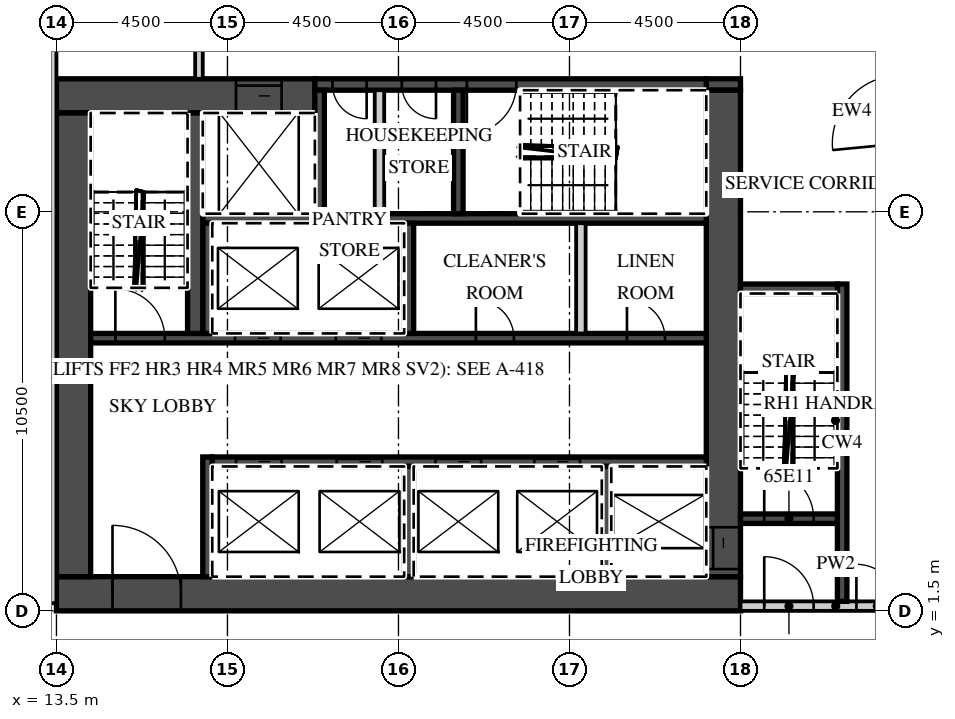
"""IFC4 building model, lengths in metres.
Left out: names, types, materials, properties, quantities, classifications, styles, units other than length and angle.
Written with IfcOpenShell. Run it as: python <this file> out.ifc"""

import sys

from ifc_helpers import new_model, si_unit, direction, frame, frame_2d, origin, place, context, subcontext, project, spatial, rectangle, extrude, element, fill, save


model = new_model("IFC4")
c1 = context("Model", 3, precision=1e-05, world=origin(), true_north=direction((0.0, 1.0)))
c2 = subcontext(c1, "Body", "Model", "MODEL_VIEW")
j1 = project(units=[si_unit("LENGTHUNIT", "METRE"), si_unit("PLANEANGLEUNIT", "RADIAN")], contexts=[c1])
p1 = place(None, origin())
s1 = spatial("IfcSite", under=j1, at=p1, CompositionType="ELEMENT")
p2 = place(p1, origin())
s2 = spatial("IfcBuilding", under=s1, at=p2, CompositionType="ELEMENT")
p3 = place(p2, frame((0.0, 0.0, 261.9)))
s3 = spatial("IfcBuildingStorey", under=s2, at=p3, CompositionType="ELEMENT", Elevation=261.9)
p4 = place(p3, frame((13.5, 1.95, 0.0), z_axis=(0.0, 0.0, 1.0), x_axis=(1.0, 0.0, 0.0)))
e1 = element("IfcWall", 1, at=p4, inside=s3, PredefinedType="SHEAR", context=c2, shape_type="SweptSolid", body=[
    extrude(rectangle(XDim=18.0, YDim=0.9, at=frame_2d((9.0, 0.0))), origin(), (0.0, 0.0, 1.0), 6.32),
])
p5 = place(p4, frame((1.475, 0.0, 0.0)))
e2 = element("IfcOpeningElement", 2, at=p5, cuts=e1, PredefinedType="OPENING", context=c2, shape_type="SweptSolid", body=[
    extrude(rectangle(XDim=1.8, YDim=2.1, at=frame_2d((0.9, 1.05))), frame((0.0, 0.46, 0.0), z_axis=(0.0, -1.0, 0.0), x_axis=(1.0, 0.0, 0.0)), (0.0, 0.0, 1.0), 0.92),
])
p6 = place(p3, frame((13.5, 15.05, 0.0), z_axis=(0.0, 0.0, 1.0), x_axis=(1.0, 0.0, 0.0)))
e3 = element("IfcWall", 3, at=p6, inside=s3, PredefinedType="SHEAR", context=c2, shape_type="SweptSolid", body=[
    extrude(rectangle(XDim=6.8, YDim=0.9, at=frame_2d((3.4, 0.0))), origin(), (0.0, 0.0, 1.0), 6.32),
])
p7 = place(p6, frame((4.725, 0.0, 0.0)))
e4 = element("IfcOpeningElement", 4, at=p7, cuts=e3, PredefinedType="OPENING", context=c2, shape_type="SweptSolid", body=[
    extrude(rectangle(XDim=1.2, YDim=2.1, at=frame_2d((0.6, 1.05))), frame((0.0, 0.46, 0.0), z_axis=(0.0, -1.0, 0.0), x_axis=(1.0, 0.0, 0.0)), (0.0, 0.0, 1.0), 0.92),
])
p8 = place(p3, frame((30.6, 15.35, 0.0), z_axis=(0.0, 0.0, 1.0), x_axis=(1.0, 0.0, 0.0)))
e5 = element("IfcWall", 5, at=p8, inside=s3, PredefinedType="SHEAR", context=c2, shape_type="SweptSolid", body=[
    extrude(rectangle(XDim=0.9, YDim=0.3, at=frame_2d((0.45, 0.0))), origin(), (0.0, 0.0, 1.0), 6.32),
])
p9 = place(p3, frame((20.3, 15.35, 0.0), z_axis=(0.0, 0.0, 1.0), x_axis=(1.0, 0.0, 0.0)))
e6 = element("IfcWall", 6, at=p9, inside=s3, PredefinedType="SHEAR", context=c2, shape_type="SweptSolid", body=[
    extrude(rectangle(XDim=10.3, YDim=0.3, at=frame_2d((5.15, 0.0))), origin(), (0.0, 0.0, 1.0), 6.32),
])
p10 = place(p9, frame((4.0, 0.0, 0.0)))
e7 = element("IfcOpeningElement", 7, at=p10, cuts=e6, PredefinedType="OPENING", context=c2, shape_type="SweptSolid", body=[
    extrude(rectangle(XDim=1.3, YDim=2.1, at=frame_2d((0.65, 1.05))), frame((0.0, 0.16, 0.0), z_axis=(0.0, -1.0, 0.0), x_axis=(1.0, 0.0, 0.0)), (0.0, 0.0, 1.0), 0.32),
])
p11 = place(p9, frame((2.288, 0.0, 0.0)))
e8 = element("IfcOpeningElement", 8, at=p11, cuts=e6, PredefinedType="OPENING", context=c2, shape_type="SweptSolid", body=[
    extrude(rectangle(XDim=0.9, YDim=2.1, at=frame_2d((0.45, 1.05))), frame((0.0, 0.16, 0.0), z_axis=(0.0, -1.0, 0.0), x_axis=(1.0, 0.0, 0.0)), (0.0, 0.0, 1.0), 0.32),
])
p12 = place(p9, frame((0.462, 0.0, 0.0)))
e9 = element("IfcOpeningElement", 9, at=p12, cuts=e6, PredefinedType="OPENING", context=c2, shape_type="SweptSolid", body=[
    extrude(rectangle(XDim=0.9, YDim=2.1, at=frame_2d((0.45, 1.05))), frame((0.0, 0.16, 0.0), z_axis=(0.0, -1.0, 0.0), x_axis=(1.0, 0.0, 0.0)), (0.0, 0.0, 1.0), 0.32),
])
p13 = place(p3, frame((31.05, 2.4, 0.0), z_axis=(0.0, 0.0, 1.0), x_axis=(0.0, 1.0, 0.0)))
e10 = element("IfcWall", 10, at=p13, inside=s3, PredefinedType="SHEAR", context=c2, shape_type="SweptSolid", body=[
    extrude(rectangle(XDim=12.8, YDim=0.9, at=frame_2d((6.4, 0.0))), origin(), (0.0, 0.0, 1.0), 6.32),
])
p14 = place(p13, frame((0.2, 0.0, 0.0)))
e11 = element("IfcOpeningElement", 11, at=p14, cuts=e10, PredefinedType="OPENING", context=c2, shape_type="SweptSolid", body=[
    extrude(rectangle(XDim=1.1, YDim=2.1, at=frame_2d((0.55, 1.05))), frame((0.0, 0.46, 0.0), z_axis=(0.0, -1.0, 0.0), x_axis=(1.0, 0.0, 0.0)), (0.0, 0.0, 1.0), 0.92),
])
p15 = place(p3, frame((13.95, 2.4, 0.0), z_axis=(0.0, 0.0, 1.0), x_axis=(0.0, 1.0, 0.0)))
e12 = element("IfcWall", 12, at=p15, inside=s3, PredefinedType="SHEAR", context=c2, shape_type="SweptSolid", body=[
    extrude(rectangle(XDim=12.2, YDim=0.9, at=frame_2d((6.1, 0.0))), origin(), (0.0, 0.0, 1.0), 6.32),
])
p16 = place(p3, frame((17.6, 5.425, 0.0), z_axis=(0.0, 0.0, 1.0), x_axis=(1.0, 0.0, 0.0)))
e13 = element("IfcWall", 13, at=p16, inside=s3, PredefinedType="SHEAR", context=c2, shape_type="SweptSolid", body=[
    extrude(rectangle(XDim=13.0, YDim=0.25, at=frame_2d((6.5, 0.0))), origin(), (0.0, 0.0, 1.0), 6.32),
])
p17 = place(p16, frame((8.475, 0.0, 0.0)))
e14 = element("IfcOpeningElement", 14, at=p17, cuts=e13, PredefinedType="OPENING", context=c2, shape_type="SweptSolid", body=[
    extrude(rectangle(XDim=1.2, YDim=2.1, at=frame_2d((0.6, 1.05))), frame((0.0, 0.135, 0.0), z_axis=(0.0, -1.0, 0.0), x_axis=(1.0, 0.0, 0.0)), (0.0, 0.0, 1.0), 0.27),
])
p18 = place(p16, frame((5.875, 0.0, 0.0)))
e15 = element("IfcOpeningElement", 15, at=p18, cuts=e13, PredefinedType="OPENING", context=c2, shape_type="SweptSolid", body=[
    extrude(rectangle(XDim=1.2, YDim=2.1, at=frame_2d((0.6, 1.05))), frame((0.0, 0.135, 0.0), z_axis=(0.0, -1.0, 0.0), x_axis=(1.0, 0.0, 0.0)), (0.0, 0.0, 1.0), 0.27),
])
p19 = place(p16, frame((3.275, 0.0, 0.0)))
e16 = element("IfcOpeningElement", 16, at=p19, cuts=e13, PredefinedType="OPENING", context=c2, shape_type="SweptSolid", body=[
    extrude(rectangle(XDim=1.2, YDim=2.1, at=frame_2d((0.6, 1.05))), frame((0.0, 0.135, 0.0), z_axis=(0.0, -1.0, 0.0), x_axis=(1.0, 0.0, 0.0)), (0.0, 0.0, 1.0), 0.27),
])
p20 = place(p16, frame((0.625, 0.0, 0.0)))
e17 = element("IfcOpeningElement", 17, at=p20, cuts=e13, PredefinedType="OPENING", context=c2, shape_type="SweptSolid", body=[
    extrude(rectangle(XDim=1.2, YDim=2.1, at=frame_2d((0.6, 1.05))), frame((0.0, 0.135, 0.0), z_axis=(0.0, -1.0, 0.0), x_axis=(1.0, 0.0, 0.0)), (0.0, 0.0, 1.0), 0.27),
])
p21 = place(p3, frame((17.475, 2.4, 0.0), z_axis=(0.0, 0.0, 1.0), x_axis=(0.0, 1.0, 0.0)))
e18 = element("IfcWall", 18, at=p21, inside=s3, PredefinedType="SHEAR", context=c2, shape_type="SweptSolid", body=[
    extrude(rectangle(XDim=3.15, YDim=0.25, at=frame_2d((1.575, 0.0))), origin(), (0.0, 0.0, 1.0), 6.32),
])
for number, where, z_axis, x_axis in (
    (19, (27.975, 2.4, 0.0), (0.0, 0.0, 1.0), (0.0, 1.0, 0.0)),
    (20, (22.775, 2.4, 0.0), (0.0, 0.0, 1.0), (0.0, 1.0, 0.0)),
):
    element("IfcWall", number, at=place(p3, frame(where, z_axis=z_axis, x_axis=x_axis)), inside=s3, PredefinedType="SHEAR", context=c2, shape_type="SweptSolid", body=[
        extrude(rectangle(XDim=2.9, YDim=0.25, at=frame_2d((1.45, 0.0))), origin(), (0.0, 0.0, 1.0), 6.32),
    ])
p22 = place(p3, frame((14.4, 8.675, 0.0), z_axis=(0.0, 0.0, 1.0), x_axis=(1.0, 0.0, 0.0)))
e21 = element("IfcWall", 21, at=p22, inside=s3, PredefinedType="SHEAR", context=c2, shape_type="SweptSolid", body=[
    extrude(rectangle(XDim=16.2, YDim=0.25, at=frame_2d((8.1, 0.0))), origin(), (0.0, 0.0, 1.0), 6.32),
])
p23 = place(p22, frame((6.45, 0.0, 0.0)))
e22 = element("IfcOpeningElement", 22, at=p23, cuts=e21, PredefinedType="OPENING", context=c2, shape_type="SweptSolid", body=[
    extrude(rectangle(XDim=1.2, YDim=2.1, at=frame_2d((0.6, 1.05))), frame((0.0, 0.135, 0.0), z_axis=(0.0, -1.0, 0.0), x_axis=(1.0, 0.0, 0.0)), (0.0, 0.0, 1.0), 0.27),
])
p24 = place(p22, frame((3.8, 0.0, 0.0)))
e23 = element("IfcOpeningElement", 23, at=p24, cuts=e21, PredefinedType="OPENING", context=c2, shape_type="SweptSolid", body=[
    extrude(rectangle(XDim=1.2, YDim=2.1, at=frame_2d((0.6, 1.05))), frame((0.0, 0.135, 0.0), z_axis=(0.0, -1.0, 0.0), x_axis=(1.0, 0.0, 0.0)), (0.0, 0.0, 1.0), 0.27),
])
p25 = place(p22, frame((0.65, 0.0, 0.0)))
e24 = element("IfcOpeningElement", 24, at=p25, cuts=e21, PredefinedType="OPENING", context=c2, shape_type="SweptSolid", body=[
    extrude(rectangle(XDim=1.3, YDim=2.1, at=frame_2d((0.65, 1.05))), frame((0.0, 0.135, 0.0), z_axis=(0.0, -1.0, 0.0), x_axis=(1.0, 0.0, 0.0)), (0.0, 0.0, 1.0), 0.27),
])
p26 = place(p22, frame((14.113, 0.0, 0.0)))
e25 = element("IfcOpeningElement", 25, at=p26, cuts=e21, PredefinedType="OPENING", context=c2, shape_type="SweptSolid", body=[
    extrude(rectangle(XDim=1.0, YDim=2.1, at=frame_2d((0.5, 1.05))), frame((0.0, 0.135, 0.0), z_axis=(0.0, -1.0, 0.0), x_axis=(1.0, 0.0, 0.0)), (0.0, 0.0, 1.0), 0.27),
])
p27 = place(p22, frame((10.137, 0.0, 0.0)))
e26 = element("IfcOpeningElement", 26, at=p27, cuts=e21, PredefinedType="OPENING", context=c2, shape_type="SweptSolid", body=[
    extrude(rectangle(XDim=1.0, YDim=2.1, at=frame_2d((0.5, 1.05))), frame((0.0, 0.135, 0.0), z_axis=(0.0, -1.0, 0.0), x_axis=(1.0, 0.0, 0.0)), (0.0, 0.0, 1.0), 0.27),
])
p28 = place(p3, frame((17.35, 11.825, 0.0), z_axis=(0.0, 0.0, 1.0), x_axis=(1.0, 0.0, 0.0)))
e27 = element("IfcWall", 27, at=p28, inside=s3, PredefinedType="SHEAR", context=c2, shape_type="SweptSolid", body=[
    extrude(rectangle(XDim=13.25, YDim=0.25, at=frame_2d((6.625, 0.0))), origin(), (0.0, 0.0, 1.0), 6.32),
])
for number, where, z_axis, x_axis in (
    (28, (17.475, 8.8, 0.0), (0.0, 0.0, 1.0), (0.0, 1.0, 0.0)),
    (29, (22.775, 8.8, 0.0), (0.0, 0.0, 1.0), (0.0, 1.0, 0.0)),
):
    element("IfcWall", number, at=place(p3, frame(where, z_axis=z_axis, x_axis=x_axis)), inside=s3, PredefinedType="SHEAR", context=c2, shape_type="SweptSolid", body=[
        extrude(rectangle(XDim=2.9, YDim=0.25, at=frame_2d((1.45, 0.0))), origin(), (0.0, 0.0, 1.0), 6.32),
    ])
p29 = place(p3, frame((27.3, 8.8, 0.0), z_axis=(0.0, 0.0, 1.0), x_axis=(0.0, 1.0, 0.0)))
e30 = element("IfcWall", 30, at=p29, inside=s3, PredefinedType="PARTITIONING", context=c2, shape_type="SweptSolid", body=[
    extrude(rectangle(XDim=2.9, YDim=0.25, at=frame_2d((1.45, 0.0))), origin(), (0.0, 0.0, 1.0), 6.32),
])
p30 = place(p3, frame((17.15, 8.8, 0.0), z_axis=(0.0, 0.0, 1.0), x_axis=(0.0, 1.0, 0.0)))
e31 = element("IfcWall", 31, at=p30, inside=s3, PredefinedType="SHEAR", context=c2, shape_type="SweptSolid", body=[
    extrude(rectangle(XDim=5.8, YDim=0.4, at=frame_2d((2.9, 0.0))), origin(), (0.0, 0.0, 1.0), 6.32),
])
for number, where, z_axis, x_axis in (
    (32, (20.425, 11.95, 0.0), (0.0, 0.0, 1.0), (0.0, 1.0, 0.0)),
    (33, (24.075, 11.95, 0.0), (0.0, 0.0, 1.0), (0.0, 1.0, 0.0)),
):
    element("IfcWall", number, at=place(p3, frame(where, z_axis=z_axis, x_axis=x_axis)), inside=s3, PredefinedType="SHEAR", context=c2, shape_type="SweptSolid", body=[
        extrude(rectangle(XDim=3.25, YDim=0.25, at=frame_2d((1.625, 0.0))), origin(), (0.0, 0.0, 1.0), 6.32),
    ])
p31 = place(p3, frame((22.0, 11.95, 0.0), z_axis=(0.0, 0.0, 1.0), x_axis=(0.0, 1.0, 0.0)))
e34 = element("IfcWall", 34, at=p31, inside=s3, PredefinedType="PARTITIONING", context=c2, shape_type="SweptSolid", body=[
    extrude(rectangle(XDim=3.25, YDim=0.25, at=frame_2d((1.625, 0.0))), origin(), (0.0, 0.0, 1.0), 6.32),
])
p32 = place(p3, frame((31.5, 1.625, 0.0), z_axis=(0.0, 0.0, 1.0), x_axis=(1.0, 0.0, 0.0)))
e35 = element("IfcWall", 35, at=p32, inside=s3, PredefinedType="PARTITIONING", context=c2, shape_type="SweptSolid", body=[
    extrude(rectangle(XDim=5.012, YDim=0.25, at=frame_2d((2.506, 0.0))), origin(), (0.0, 0.0, 1.0), 6.32),
])
p33 = place(p32, frame((0.625, 0.0, 0.0)))
e36 = element("IfcOpeningElement", 36, at=p33, cuts=e35, PredefinedType="OPENING", context=c2, shape_type="SweptSolid", body=[
    extrude(rectangle(XDim=1.3, YDim=2.1, at=frame_2d((0.65, 1.05))), frame((0.0, 0.135, 0.0), z_axis=(0.0, -1.0, 0.0), x_axis=(1.0, 0.0, 0.0)), (0.0, 0.0, 1.0), 0.27),
])
p34 = place(p32, frame((3.05, 0.0, 0.0)))
e37 = element("IfcOpeningElement", 37, at=p34, cuts=e35, PredefinedType="OPENING", context=c2, shape_type="SweptSolid", body=[
    extrude(rectangle(XDim=1.1, YDim=2.1, at=frame_2d((0.55, 1.05))), frame((0.0, 0.135, 0.0), z_axis=(0.0, -1.0, 0.0), x_axis=(1.0, 0.0, 0.0)), (0.0, 0.0, 1.0), 0.27),
])
p35 = place(p3, frame((31.5, 3.925, 0.0), z_axis=(0.0, 0.0, 1.0), x_axis=(1.0, 0.0, 0.0)))
e38 = element("IfcWall", 38, at=p35, inside=s3, PredefinedType="SHEAR", context=c2, shape_type="SweptSolid", body=[
    extrude(rectangle(XDim=2.55, YDim=0.25, at=frame_2d((1.275, 0.0))), origin(), (0.0, 0.0, 1.0), 6.32),
])
p36 = place(p35, frame((0.625, 0.0, 0.0)))
e39 = element("IfcOpeningElement", 39, at=p36, cuts=e38, PredefinedType="OPENING", context=c2, shape_type="SweptSolid", body=[
    extrude(rectangle(XDim=1.3, YDim=2.1, at=frame_2d((0.65, 1.05))), frame((0.0, 0.135, 0.0), z_axis=(0.0, -1.0, 0.0), x_axis=(1.0, 0.0, 0.0)), (0.0, 0.0, 1.0), 0.27),
])
p37 = place(p3, frame((34.175, 1.75, 0.0), z_axis=(0.0, 0.0, 1.0), x_axis=(0.0, 1.0, 0.0)))
e40 = element("IfcWall", 40, at=p37, inside=s3, PredefinedType="SHEAR", context=c2, shape_type="SweptSolid", body=[
    extrude(rectangle(XDim=8.35, YDim=0.25, at=frame_2d((4.175, 0.0))), origin(), (0.0, 0.0, 1.0), 6.32),
])
p38 = place(p3, frame((31.5, 9.975, 0.0), z_axis=(0.0, 0.0, 1.0), x_axis=(1.0, 0.0, 0.0)))
e41 = element("IfcWall", 41, at=p38, inside=s3, PredefinedType="SHEAR", context=c2, shape_type="SweptSolid", body=[
    extrude(rectangle(XDim=2.55, YDim=0.25, at=frame_2d((1.275, 0.0))), origin(), (0.0, 0.0, 1.0), 6.32),
])
p39 = place(p3, frame((17.25, 15.5, 0.0), z_axis=(0.0, 0.0, 1.0), x_axis=(0.0, 1.0, 0.0)))
e42 = element("IfcWall", 42, at=p39, inside=s3, PredefinedType="PARTITIONING", context=c2, shape_type="SweptSolid", body=[
    extrude(rectangle(XDim=2.2, YDim=0.2, at=frame_2d((1.1, 0.0))), origin(), (0.0, 0.0, 1.0), 6.32),
])
p40 = place(p3, frame((13.4, 1.7, 0.0), z_axis=(0.0, 0.0, 1.0), x_axis=(0.0, 1.0, 0.0)))
e43 = element("IfcWall", 43, at=p40, inside=s3, PredefinedType="PARTITIONING", context=c2, shape_type="SweptSolid", body=[
    extrude(rectangle(XDim=19.077, YDim=0.2, at=frame_2d((9.538, 0.0))), origin(), (0.0, 0.0, 1.0), 6.32),
])
p41 = place(p23, origin())
e44 = element("IfcDoor", 44, at=p41, inside=s3, OperationType="SLIDING_TO_LEFT", PredefinedType="DOOR", context=c2, shape_type="SweptSolid", body=[
    extrude(rectangle(XDim=1.2, YDim=2.1, at=frame_2d((0.6, 1.05))), frame((0.0, 0.025, 0.0), z_axis=(0.0, -1.0, 0.0), x_axis=(1.0, 0.0, 0.0)), (0.0, 0.0, 1.0), 0.05),
])
fill(e22, e44)
p42 = place(p24, origin())
e45 = element("IfcDoor", 45, at=p42, inside=s3, OperationType="SLIDING_TO_RIGHT", PredefinedType="DOOR", context=c2, shape_type="SweptSolid", body=[
    extrude(rectangle(XDim=1.2, YDim=2.1, at=frame_2d((0.6, 1.05))), frame((0.0, 0.025, 0.0), z_axis=(0.0, -1.0, 0.0), x_axis=(1.0, 0.0, 0.0)), (0.0, 0.0, 1.0), 0.05),
])
fill(e23, e45)
p43 = place(p17, origin())
e46 = element("IfcDoor", 46, at=p43, inside=s3, OperationType="SLIDING_TO_LEFT", PredefinedType="DOOR", context=c2, shape_type="SweptSolid", body=[
    extrude(rectangle(XDim=1.2, YDim=2.1, at=frame_2d((0.6, 1.05))), frame((0.0, 0.025, 0.0), z_axis=(0.0, -1.0, 0.0), x_axis=(1.0, 0.0, 0.0)), (0.0, 0.0, 1.0), 0.05),
])
fill(e14, e46)
p44 = place(p18, origin())
e47 = element("IfcDoor", 47, at=p44, inside=s3, OperationType="SLIDING_TO_RIGHT", PredefinedType="DOOR", context=c2, shape_type="SweptSolid", body=[
    extrude(rectangle(XDim=1.2, YDim=2.1, at=frame_2d((0.6, 1.05))), frame((0.0, 0.025, 0.0), z_axis=(0.0, -1.0, 0.0), x_axis=(1.0, 0.0, 0.0)), (0.0, 0.0, 1.0), 0.05),
])
fill(e15, e47)
p45 = place(p19, origin())
e48 = element("IfcDoor", 48, at=p45, inside=s3, OperationType="SLIDING_TO_RIGHT", PredefinedType="DOOR", context=c2, shape_type="SweptSolid", body=[
    extrude(rectangle(XDim=1.2, YDim=2.1, at=frame_2d((0.6, 1.05))), frame((0.0, 0.025, 0.0), z_axis=(0.0, -1.0, 0.0), x_axis=(1.0, 0.0, 0.0)), (0.0, 0.0, 1.0), 0.05),
])
fill(e16, e48)
p46 = place(p20, origin())
e49 = element("IfcDoor", 49, at=p46, inside=s3, OperationType="SLIDING_TO_LEFT", PredefinedType="DOOR", context=c2, shape_type="SweptSolid", body=[
    extrude(rectangle(XDim=1.2, YDim=2.1, at=frame_2d((0.6, 1.05))), frame((0.0, 0.025, 0.0), z_axis=(0.0, -1.0, 0.0), x_axis=(1.0, 0.0, 0.0)), (0.0, 0.0, 1.0), 0.05),
])
fill(e17, e49)
p47 = place(p7, origin())
e50 = element("IfcDoor", 50, at=p47, inside=s3, OperationType="SLIDING_TO_LEFT", PredefinedType="DOOR", context=c2, shape_type="SweptSolid", body=[
    extrude(rectangle(XDim=1.2, YDim=2.1, at=frame_2d((0.6, 1.05))), frame((0.0, 0.025, 0.0), z_axis=(0.0, -1.0, 0.0), x_axis=(1.0, 0.0, 0.0)), (0.0, 0.0, 1.0), 0.05),
])
fill(e4, e50)
p48 = place(p14, origin())
e51 = element("IfcDoor", 51, at=p48, inside=s3, OperationType="SLIDING_TO_LEFT", PredefinedType="DOOR", context=c2, shape_type="SweptSolid", body=[
    extrude(rectangle(XDim=1.1, YDim=2.1, at=frame_2d((0.55, 1.05))), frame((0.0, 0.025, 0.0), z_axis=(0.0, -1.0, 0.0), x_axis=(1.0, 0.0, 0.0)), (0.0, 0.0, 1.0), 0.05),
])
fill(e11, e51)
p49 = place(p5, origin())
e52 = element("IfcDoor", 52, at=p49, inside=s3, OperationType="DOUBLE_DOOR_DOUBLE_SWING", PredefinedType="DOOR", context=c2, shape_type="SweptSolid", body=[
    extrude(rectangle(XDim=1.8, YDim=2.1, at=frame_2d((0.9, 1.05))), frame((0.0, 0.025, 0.0), z_axis=(0.0, -1.0, 0.0), x_axis=(1.0, 0.0, 0.0)), (0.0, 0.0, 1.0), 0.05),
])
fill(e2, e52)
p50 = place(p33, origin())
e53 = element("IfcDoor", 53, at=p50, inside=s3, OperationType="SINGLE_SWING_LEFT", PredefinedType="DOOR", context=c2, shape_type="SweptSolid", body=[
    extrude(rectangle(XDim=1.3, YDim=2.1, at=frame_2d((0.65, 1.05))), frame((0.0, 0.025, 0.0), z_axis=(0.0, -1.0, 0.0), x_axis=(1.0, 0.0, 0.0)), (0.0, 0.0, 1.0), 0.05),
])
fill(e36, e53)
p51 = place(p36, origin())
e54 = element("IfcDoor", 54, at=p51, inside=s3, OperationType="SINGLE_SWING_LEFT", PredefinedType="DOOR", context=c2, shape_type="SweptSolid", body=[
    extrude(rectangle(XDim=1.3, YDim=2.1, at=frame_2d((0.65, 1.05))), frame((0.0, 0.025, 0.0), z_axis=(0.0, -1.0, 0.0), x_axis=(1.0, 0.0, 0.0)), (0.0, 0.0, 1.0), 0.05),
])
fill(e39, e54)
p52 = place(p34, origin())
e55 = element("IfcDoor", 55, at=p52, inside=s3, OperationType="SINGLE_SWING_LEFT", PredefinedType="DOOR", context=c2, shape_type="SweptSolid", body=[
    extrude(rectangle(XDim=1.1, YDim=2.1, at=frame_2d((0.55, 1.05))), frame((0.0, 0.025, 0.0), z_axis=(0.0, -1.0, 0.0), x_axis=(1.0, 0.0, 0.0)), (0.0, 0.0, 1.0), 0.05),
])
fill(e37, e55)
p53 = place(p25, origin())
e56 = element("IfcDoor", 56, at=p53, inside=s3, OperationType="SINGLE_SWING_LEFT", PredefinedType="DOOR", context=c2, shape_type="SweptSolid", body=[
    extrude(rectangle(XDim=1.3, YDim=2.1, at=frame_2d((0.65, 1.05))), frame((0.0, 0.025, 0.0), z_axis=(0.0, -1.0, 0.0), x_axis=(1.0, 0.0, 0.0)), (0.0, 0.0, 1.0), 0.05),
])
fill(e24, e56)
p54 = place(p10, origin())
e57 = element("IfcDoor", 57, at=p54, inside=s3, OperationType="SINGLE_SWING_LEFT", PredefinedType="DOOR", context=c2, shape_type="SweptSolid", body=[
    extrude(rectangle(XDim=1.3, YDim=2.1, at=frame_2d((0.65, 1.05))), frame((0.0, 0.025, 0.0), z_axis=(0.0, -1.0, 0.0), x_axis=(1.0, 0.0, 0.0)), (0.0, 0.0, 1.0), 0.05),
])
fill(e7, e57)
p55 = place(p11, origin())
e58 = element("IfcDoor", 58, at=p55, inside=s3, OperationType="SINGLE_SWING_RIGHT", PredefinedType="DOOR", context=c2, shape_type="SweptSolid", body=[
    extrude(rectangle(XDim=0.9, YDim=2.1, at=frame_2d((0.45, 1.05))), frame((0.0, 0.025, 0.0), z_axis=(0.0, -1.0, 0.0), x_axis=(1.0, 0.0, 0.0)), (0.0, 0.0, 1.0), 0.05),
])
fill(e8, e58)
p56 = place(p12, origin())
e59 = element("IfcDoor", 59, at=p56, inside=s3, OperationType="SINGLE_SWING_RIGHT", PredefinedType="DOOR", context=c2, shape_type="SweptSolid", body=[
    extrude(rectangle(XDim=0.9, YDim=2.1, at=frame_2d((0.45, 1.05))), frame((0.0, 0.025, 0.0), z_axis=(0.0, -1.0, 0.0), x_axis=(1.0, 0.0, 0.0)), (0.0, 0.0, 1.0), 0.05),
])
fill(e9, e59)
p57 = place(p26, origin())
e60 = element("IfcDoor", 60, at=p57, inside=s3, OperationType="SINGLE_SWING_LEFT", PredefinedType="DOOR", context=c2, shape_type="SweptSolid", body=[
    extrude(rectangle(XDim=1.0, YDim=2.1, at=frame_2d((0.5, 1.05))), frame((0.0, 0.025, 0.0), z_axis=(0.0, -1.0, 0.0), x_axis=(1.0, 0.0, 0.0)), (0.0, 0.0, 1.0), 0.05),
])
fill(e25, e60)
p58 = place(p27, origin())
e61 = element("IfcDoor", 61, at=p58, inside=s3, OperationType="SINGLE_SWING_LEFT", PredefinedType="DOOR", context=c2, shape_type="SweptSolid", body=[
    extrude(rectangle(XDim=1.0, YDim=2.1, at=frame_2d((0.5, 1.05))), frame((0.0, 0.025, 0.0), z_axis=(0.0, -1.0, 0.0), x_axis=(1.0, 0.0, 0.0)), (0.0, 0.0, 1.0), 0.05),
])
fill(e26, e61)
save(model, sys.argv[1])
